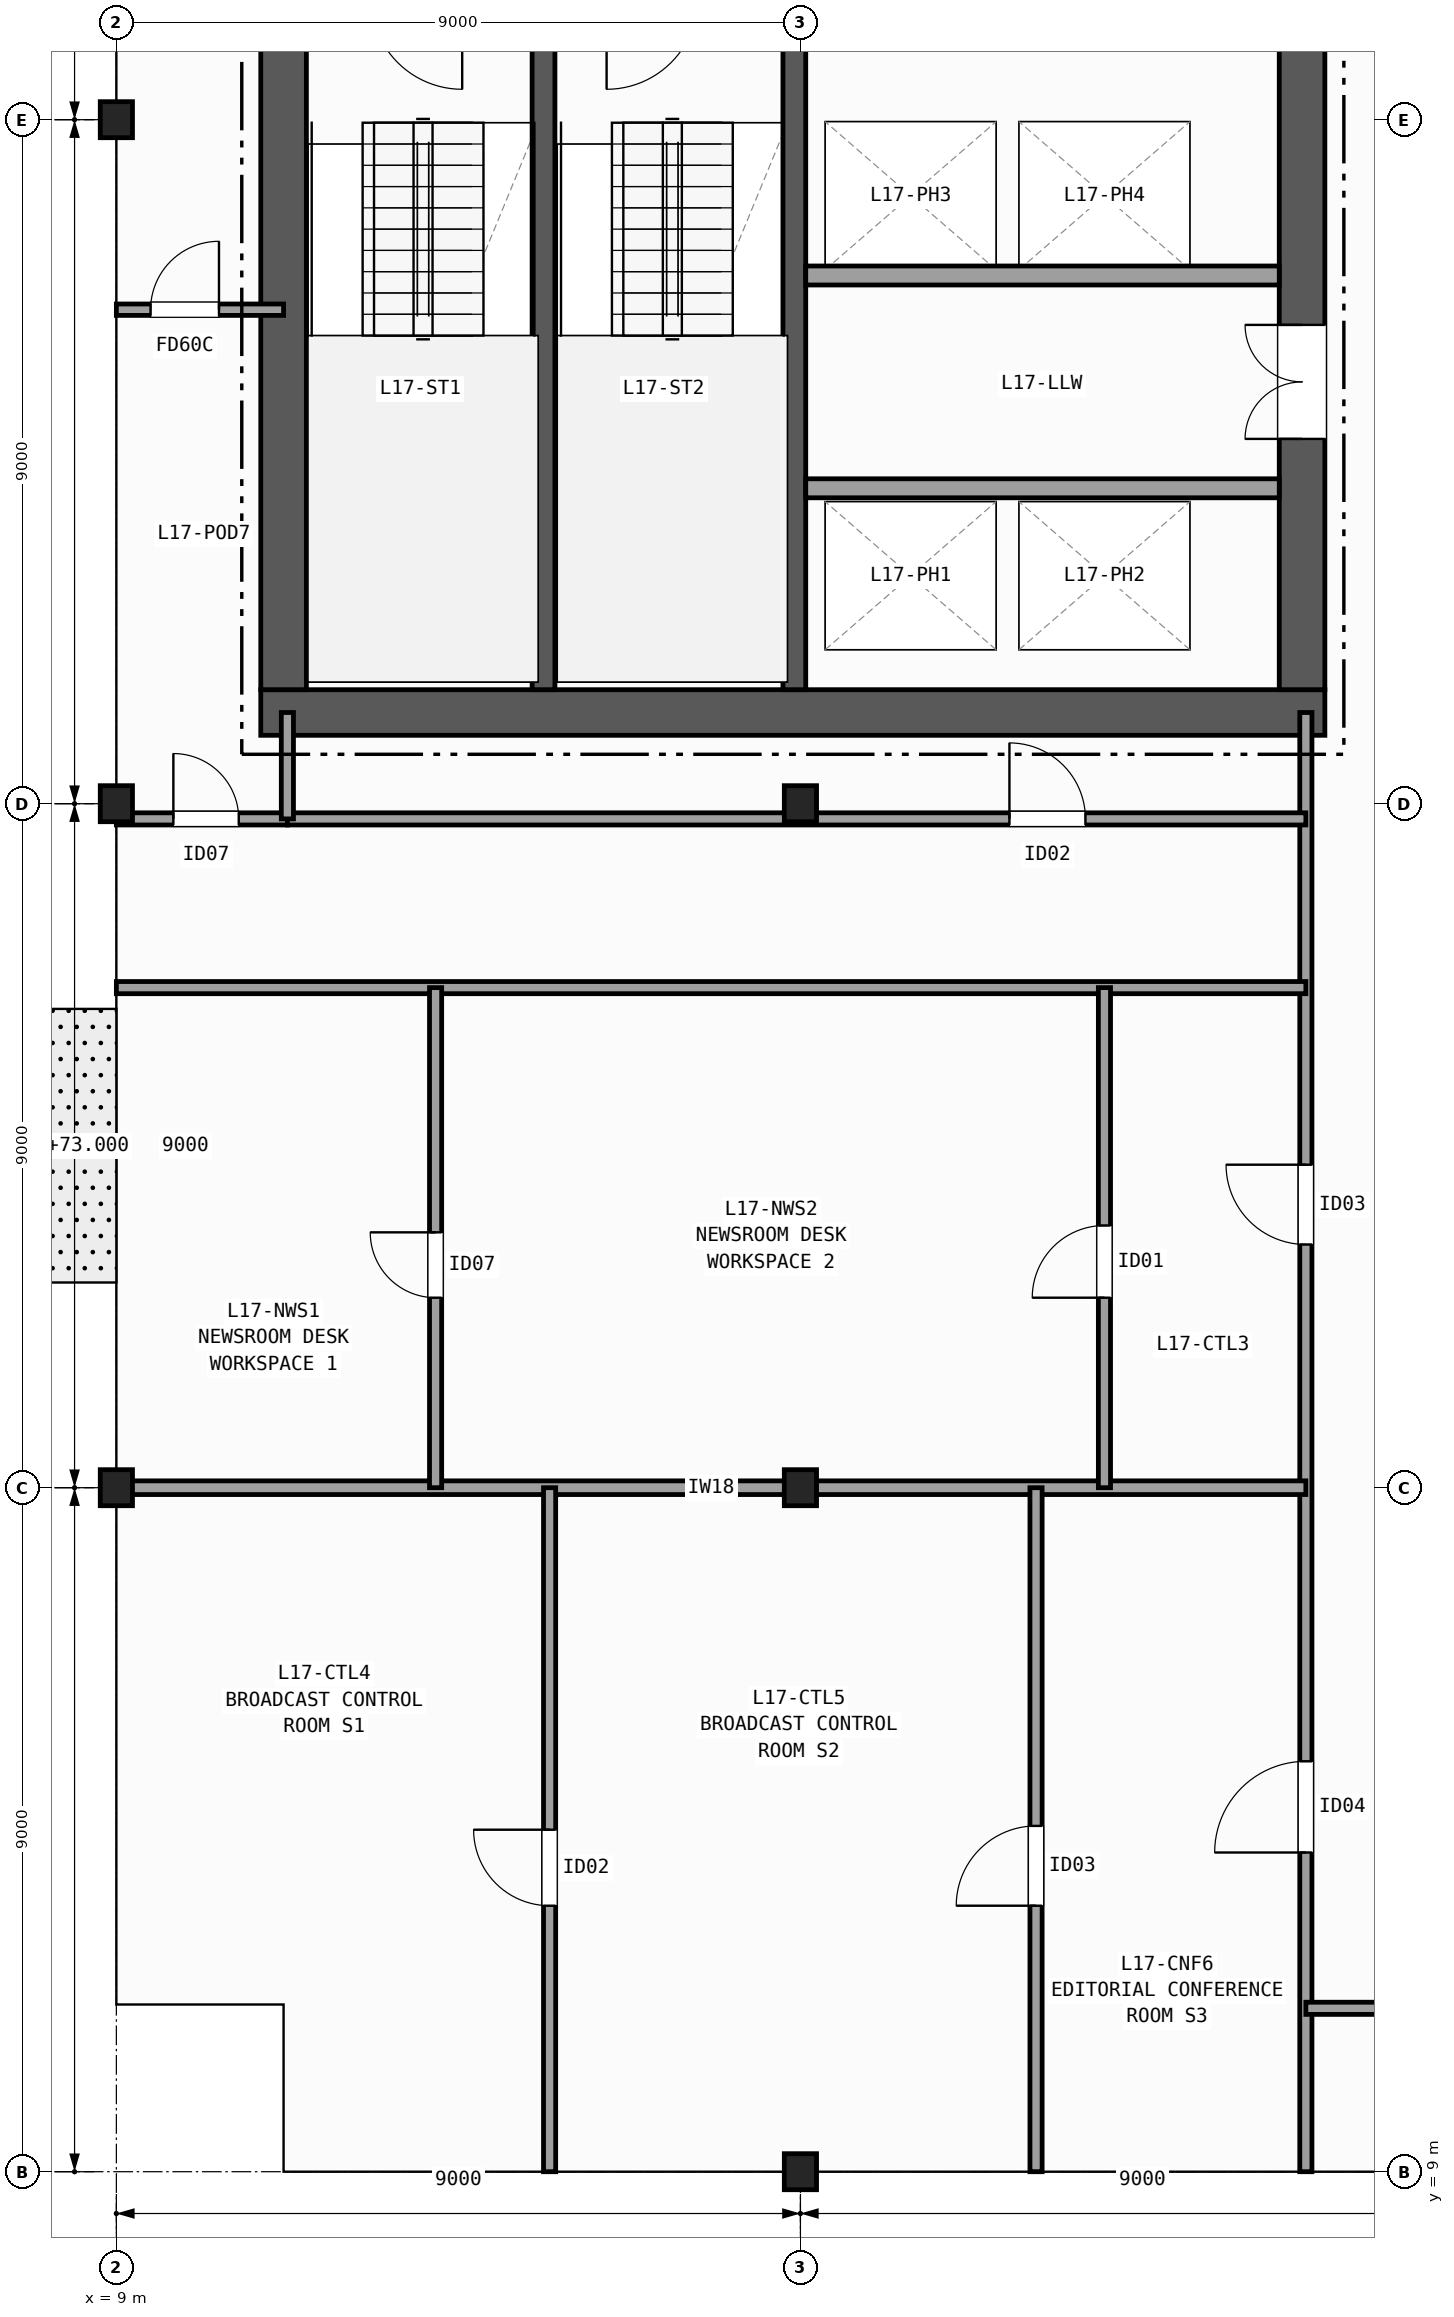
"""IFC4 building model, lengths in metres.
Left out: names, types, materials, properties, quantities, classifications, styles, units other than length and angle.
Written with IfcOpenShell. Run it as: python <this file> out.ifc"""

import sys

from ifc_helpers import new_model, si_unit, direction, frame, frame_2d, origin, origin_2d, place, context, subcontext, project, spatial, rectangle, i_section, extrude, element, fill, save


model = new_model("IFC4")
c1 = context("Model", 3, precision=1e-05, world=origin(), true_north=direction((0.0, 1.0)))
c2 = subcontext(c1, "Body", "Model", "MODEL_VIEW")
j1 = project(units=[si_unit("LENGTHUNIT", "METRE"), si_unit("PLANEANGLEUNIT", "RADIAN")], contexts=[c1])
p1 = place(None, origin())
s1 = spatial("IfcSite", under=j1, at=p1, CompositionType="ELEMENT")
p2 = place(p1, origin())
s2 = spatial("IfcBuilding", under=s1, at=p2, CompositionType="ELEMENT")
p3 = place(p2, frame((0.0, 0.0, 73.0)))
s3 = spatial("IfcBuildingStorey", under=s2, at=p3, CompositionType="ELEMENT", Elevation=73.0)
for number, where, z_axis, x_axis in (
    (1, (9.0, 18.0, 0.0), (0.0, 0.0, 1.0), (1.0, 0.0, 0.0)),
    (2, (9.0, 27.0, 0.0), (0.0, 0.0, 1.0), (1.0, 0.0, 0.0)),
    (3, (9.0, 36.0, 0.0), (0.0, 0.0, 1.0), (1.0, 0.0, 0.0)),
    (4, (18.0, 9.0, 0.0), (0.0, 0.0, 1.0), (1.0, 0.0, 0.0)),
    (5, (18.0, 18.0, 0.0), (0.0, 0.0, 1.0), (1.0, 0.0, 0.0)),
    (6, (18.0, 27.0, 0.0), (0.0, 0.0, 1.0), (1.0, 0.0, 0.0)),
):
    element("IfcColumn", number, at=place(p3, frame(where, z_axis=z_axis, x_axis=x_axis)), inside=s3, PredefinedType="COLUMN", context=c2, shape_type="SweptSolid", body=[
        extrude(i_section(OverallWidth=0.424, OverallDepth=0.474, WebThickness=0.048, FlangeThickness=0.077, FilletRadius=0.015, at=origin_2d()), origin(), (0.0, 0.0, 1.0), 3.7),
    ])
p4 = place(p3, frame((10.9, 28.2, 0.0), z_axis=(0.0, 0.0, 1.0), x_axis=(1.0, 0.0, 0.0)))
e7 = element("IfcWall", 7, at=p4, inside=s3, PredefinedType="SHEAR", context=c2, shape_type="SweptSolid", body=[
    extrude(rectangle(XDim=14.0, YDim=0.6, at=frame_2d((7.0, 0.0))), origin(), (0.0, 0.0, 1.0), 3.42),
])
p5 = place(p3, frame((11.2, 42.1, 0.0), z_axis=(0.0, 0.0, 1.0), x_axis=(0.0, -1.0, 0.0)))
e8 = element("IfcWall", 8, at=p5, inside=s3, PredefinedType="SHEAR", context=c2, shape_type="SweptSolid", body=[
    extrude(rectangle(XDim=13.6, YDim=0.6, at=frame_2d((6.8, 0.0))), origin(), (0.0, 0.0, 1.0), 3.42),
])
p6 = place(p3, frame((24.6, 28.5, 0.0), z_axis=(0.0, 0.0, 1.0), x_axis=(0.0, 1.0, 0.0)))
e9 = element("IfcWall", 9, at=p6, inside=s3, PredefinedType="SHEAR", context=c2, shape_type="SweptSolid", body=[
    extrude(rectangle(XDim=13.6, YDim=0.6, at=frame_2d((6.8, 0.0))), origin(), (0.0, 0.0, 1.0), 3.42),
])
p7 = place(p6, frame((3.3, 0.0, 0.0)))
e10 = element("IfcOpeningElement", 10, at=p7, cuts=e9, PredefinedType="OPENING", context=c2, shape_type="SweptSolid", body=[
    extrude(rectangle(XDim=1.5, YDim=2.2, at=frame_2d((0.75, 1.1))), frame((0.0, 0.31, 0.0), z_axis=(0.0, -1.0, 0.0), x_axis=(1.0, 0.0, 0.0)), (0.0, 0.0, 1.0), 0.62),
])
p8 = place(p6, frame((9.9, 0.0, 0.0)))
e11 = element("IfcOpeningElement", 11, at=p8, cuts=e9, PredefinedType="OPENING", context=c2, shape_type="SweptSolid", body=[
    extrude(rectangle(XDim=0.9, YDim=2.1, at=frame_2d((0.45, 1.05))), frame((0.0, 0.31, 0.0), z_axis=(0.0, -1.0, 0.0), x_axis=(1.0, 0.0, 0.0)), (0.0, 0.0, 1.0), 0.62),
])
p9 = place(p3, frame((14.62, 28.5, 0.0), z_axis=(0.0, 0.0, 1.0), x_axis=(0.0, 1.0, 0.0)))
e12 = element("IfcWall", 12, at=p9, inside=s3, PredefinedType="SHEAR", context=c2, shape_type="SweptSolid", body=[
    extrude(rectangle(XDim=8.95, YDim=0.3, at=frame_2d((4.475, 0.0))), origin(), (0.0, 0.0, 1.0), 3.42),
])
p10 = place(p3, frame((17.92, 42.1, 0.0), z_axis=(0.0, 0.0, 1.0), x_axis=(0.0, -1.0, 0.0)))
e13 = element("IfcWall", 13, at=p10, inside=s3, PredefinedType="SHEAR", context=c2, shape_type="SweptSolid", body=[
    extrude(rectangle(XDim=13.6, YDim=0.3, at=frame_2d((6.8, 0.0))), origin(), (0.0, 0.0, 1.0), 3.42),
])
p11 = place(p10, frame((1.925, 0.0, 0.0)))
e14 = element("IfcOpeningElement", 14, at=p11, cuts=e13, PredefinedType="OPENING", context=c2, shape_type="SweptSolid", body=[
    extrude(rectangle(XDim=1.15, YDim=2.15, at=frame_2d((0.575, 1.075))), frame((0.0, 0.16, 0.0), z_axis=(0.0, -1.0, 0.0), x_axis=(1.0, 0.0, 0.0)), (0.0, 0.0, 1.0), 0.32),
])
for number, where, z_axis, x_axis in (
    (15, (18.07, 31.15, 0.0), (0.0, 0.0, 1.0), (1.0, 0.0, 0.0)),
    (16, (24.3, 33.95, 0.0), (0.0, 0.0, 1.0), (-1.0, 0.0, 0.0)),
):
    element("IfcWall", number, at=place(p3, frame(where, z_axis=z_axis, x_axis=x_axis)), inside=s3, PredefinedType="PARTITIONING", context=c2, shape_type="SweptSolid", body=[
        extrude(rectangle(XDim=6.23, YDim=0.25, at=frame_2d((3.115, 0.0))), origin(), (0.0, 0.0, 1.0), 3.42),
    ])
p12 = place(p3, frame((9.0, 26.8, 0.0), z_axis=(0.0, 0.0, 1.0), x_axis=(1.0, 0.0, 0.0)))
e17 = element("IfcWall", 17, at=p12, inside=s3, PredefinedType="PARTITIONING", context=c2, shape_type="SweptSolid", body=[
    extrude(rectangle(XDim=2.25, YDim=0.16, at=frame_2d((1.125, 0.0))), origin(), (0.0, 0.0, 1.0), 2.627),
])
p13 = place(p12, frame((0.75, 0.0, 0.0)))
e18 = element("IfcOpeningElement", 18, at=p13, cuts=e17, PredefinedType="OPENING", context=c2, shape_type="SweptSolid", body=[
    extrude(rectangle(XDim=0.86, YDim=2.05, at=frame_2d((0.43, 1.025))), frame((0.0, 0.09, 0.0), z_axis=(0.0, -1.0, 0.0), x_axis=(1.0, 0.0, 0.0)), (0.0, 0.0, 1.0), 0.18),
])
p14 = place(p3, frame((9.0, 33.5, 0.0), z_axis=(0.0, 0.0, 1.0), x_axis=(1.0, 0.0, 0.0)))
e19 = element("IfcWall", 19, at=p14, inside=s3, PredefinedType="PARTITIONING", context=c2, shape_type="SweptSolid", body=[
    extrude(rectangle(XDim=2.2, YDim=0.15, at=frame_2d((1.1, 0.0))), origin(), (0.0, 0.0, 1.0), 2.627),
])
p15 = place(p14, frame((0.45, 0.0, 0.0)))
e20 = element("IfcOpeningElement", 20, at=p15, cuts=e19, PredefinedType="OPENING", context=c2, shape_type="SweptSolid", body=[
    extrude(rectangle(XDim=0.9, YDim=2.1, at=frame_2d((0.45, 1.05))), frame((0.0, 0.085, 0.0), z_axis=(0.0, -1.0, 0.0), x_axis=(1.0, 0.0, 0.0)), (0.0, 0.0, 1.0), 0.17),
])
p16 = place(p3, frame((24.65, 9.0, 0.0), z_axis=(0.0, 0.0, 1.0), x_axis=(0.0, 1.0, 0.0)))
e21 = element("IfcWall", 21, at=p16, inside=s3, PredefinedType="PARTITIONING", context=c2, shape_type="SweptSolid", body=[
    extrude(rectangle(XDim=19.2, YDim=0.16, at=frame_2d((9.6, 0.0))), origin(), (0.0, 0.0, 1.0), 2.627),
])
p17 = place(p16, frame((12.2, 0.0, 0.0)))
e22 = element("IfcOpeningElement", 22, at=p17, cuts=e21, PredefinedType="OPENING", context=c2, shape_type="SweptSolid", body=[
    extrude(rectangle(XDim=1.05, YDim=2.15, at=frame_2d((0.525, 1.075))), frame((0.0, 0.09, 0.0), z_axis=(0.0, -1.0, 0.0), x_axis=(1.0, 0.0, 0.0)), (0.0, 0.0, 1.0), 0.18),
])
p18 = place(p16, frame((4.2, 0.0, 0.0)))
e23 = element("IfcOpeningElement", 23, at=p18, cuts=e21, PredefinedType="OPENING", context=c2, shape_type="SweptSolid", body=[
    extrude(rectangle(XDim=1.2, YDim=2.15, at=frame_2d((0.6, 1.075))), frame((0.0, 0.09, 0.0), z_axis=(0.0, -1.0, 0.0), x_axis=(1.0, 0.0, 0.0)), (0.0, 0.0, 1.0), 0.18),
])
p19 = place(p3, frame((9.0, 24.58, 0.0), z_axis=(0.0, 0.0, 1.0), x_axis=(1.0, 0.0, 0.0)))
e24 = element("IfcWall", 24, at=p19, inside=s3, PredefinedType="PARTITIONING", context=c2, shape_type="SweptSolid", body=[
    extrude(rectangle(XDim=15.65, YDim=0.16, at=frame_2d((7.825, 0.0))), origin(), (0.0, 0.0, 1.0), 2.627),
])
p20 = place(p3, frame((11.25, 26.8, 0.0), z_axis=(0.0, 0.0, 1.0), x_axis=(1.0, 0.0, 0.0)))
e25 = element("IfcWall", 25, at=p20, inside=s3, PredefinedType="PARTITIONING", context=c2, shape_type="SweptSolid", body=[
    extrude(rectangle(XDim=13.4, YDim=0.16, at=frame_2d((6.7, 0.0))), origin(), (0.0, 0.0, 1.0), 2.789),
])
p21 = place(p20, frame((9.5, 0.0, 0.0)))
e26 = element("IfcOpeningElement", 26, at=p21, cuts=e25, PredefinedType="OPENING", context=c2, shape_type="SweptSolid", body=[
    extrude(rectangle(XDim=1.0, YDim=2.1, at=frame_2d((0.5, 1.05))), frame((0.0, 0.09, 0.0), z_axis=(0.0, -1.0, 0.0), x_axis=(1.0, 0.0, 0.0)), (0.0, 0.0, 1.0), 0.18),
])
p22 = place(p3, frame((11.25, 26.8, 0.0), z_axis=(0.0, 0.0, 1.0), x_axis=(0.0, 1.0, 0.0)))
e27 = element("IfcWall", 27, at=p22, inside=s3, PredefinedType="PARTITIONING", context=c2, shape_type="SweptSolid", body=[
    extrude(rectangle(XDim=1.4, YDim=0.16, at=frame_2d((0.7, 0.0))), origin(), (0.0, 0.0, 1.0), 2.789),
])
p23 = place(p3, frame((9.0, 18.0, 0.0), z_axis=(0.0, 0.0, 1.0), x_axis=(1.0, 0.0, 0.0)))
e28 = element("IfcWall", 28, at=p23, inside=s3, PredefinedType="PARTITIONING", context=c2, shape_type="SweptSolid", body=[
    extrude(rectangle(XDim=15.65, YDim=0.18, at=frame_2d((7.825, 0.0))), origin(), (0.0, 0.0, 1.0), 2.627),
])
p24 = place(p3, frame((13.2, 18.0, 0.0), z_axis=(0.0, 0.0, 1.0), x_axis=(0.0, 1.0, 0.0)))
e29 = element("IfcWall", 29, at=p24, inside=s3, PredefinedType="PARTITIONING", context=c2, shape_type="SweptSolid", body=[
    extrude(rectangle(XDim=6.58, YDim=0.16, at=frame_2d((3.29, 0.0))), origin(), (0.0, 0.0, 1.0), 2.789),
])
p25 = place(p24, frame((2.5, 0.0, 0.0)))
e30 = element("IfcOpeningElement", 30, at=p25, cuts=e29, PredefinedType="OPENING", context=c2, shape_type="SweptSolid", body=[
    extrude(rectangle(XDim=0.86, YDim=2.05, at=frame_2d((0.43, 1.025))), frame((0.0, 0.09, 0.0), z_axis=(0.0, -1.0, 0.0), x_axis=(1.0, 0.0, 0.0)), (0.0, 0.0, 1.0), 0.18),
])
p26 = place(p3, frame((22.0, 18.0, 0.0), z_axis=(0.0, 0.0, 1.0), x_axis=(0.0, 1.0, 0.0)))
e31 = element("IfcWall", 31, at=p26, inside=s3, PredefinedType="PARTITIONING", context=c2, shape_type="SweptSolid", body=[
    extrude(rectangle(XDim=6.58, YDim=0.16, at=frame_2d((3.29, 0.0))), origin(), (0.0, 0.0, 1.0), 2.789),
])
p27 = place(p26, frame((2.5, 0.0, 0.0)))
e32 = element("IfcOpeningElement", 32, at=p27, cuts=e31, PredefinedType="OPENING", context=c2, shape_type="SweptSolid", body=[
    extrude(rectangle(XDim=0.95, YDim=2.1, at=frame_2d((0.475, 1.05))), frame((0.0, 0.09, 0.0), z_axis=(0.0, -1.0, 0.0), x_axis=(1.0, 0.0, 0.0)), (0.0, 0.0, 1.0), 0.18),
])
p28 = place(p3, frame((14.7, 9.0, 0.0), z_axis=(0.0, 0.0, 1.0), x_axis=(0.0, 1.0, 0.0)))
e33 = element("IfcWall", 33, at=p28, inside=s3, PredefinedType="PARTITIONING", context=c2, shape_type="SweptSolid", body=[
    extrude(rectangle(XDim=9.0, YDim=0.16, at=frame_2d((4.5, 0.0))), origin(), (0.0, 0.0, 1.0), 2.789),
])
p29 = place(p28, frame((3.5, 0.0, 0.0)))
e34 = element("IfcOpeningElement", 34, at=p29, cuts=e33, PredefinedType="OPENING", context=c2, shape_type="SweptSolid", body=[
    extrude(rectangle(XDim=1.0, YDim=2.1, at=frame_2d((0.5, 1.05))), frame((0.0, 0.09, 0.0), z_axis=(0.0, -1.0, 0.0), x_axis=(1.0, 0.0, 0.0)), (0.0, 0.0, 1.0), 0.18),
])
p30 = place(p3, frame((21.1, 9.0, 0.0), z_axis=(0.0, 0.0, 1.0), x_axis=(0.0, 1.0, 0.0)))
e35 = element("IfcWall", 35, at=p30, inside=s3, PredefinedType="PARTITIONING", context=c2, shape_type="SweptSolid", body=[
    extrude(rectangle(XDim=9.0, YDim=0.16, at=frame_2d((4.5, 0.0))), origin(), (0.0, 0.0, 1.0), 2.627),
])
p31 = place(p30, frame((3.5, 0.0, 0.0)))
e36 = element("IfcOpeningElement", 36, at=p31, cuts=e35, PredefinedType="OPENING", context=c2, shape_type="SweptSolid", body=[
    extrude(rectangle(XDim=1.05, YDim=2.15, at=frame_2d((0.525, 1.075))), frame((0.0, 0.09, 0.0), z_axis=(0.0, -1.0, 0.0), x_axis=(1.0, 0.0, 0.0)), (0.0, 0.0, 1.0), 0.18),
])
p32 = place(p3, frame((24.65, 11.15, 0.0), z_axis=(0.0, 0.0, 1.0), x_axis=(1.0, 0.0, 0.0)))
e37 = element("IfcWall", 37, at=p32, inside=s3, PredefinedType="PARTITIONING", context=c2, shape_type="SweptSolid", body=[
    extrude(rectangle(XDim=4.75, YDim=0.16, at=frame_2d((2.375, 0.0))), origin(), (0.0, 0.0, 1.0), 2.792),
])
p33 = place(p32, frame((1.2, 0.0, 0.0)))
e38 = element("IfcOpeningElement", 38, at=p33, cuts=e37, PredefinedType="OPENING", context=c2, shape_type="SweptSolid", body=[
    extrude(rectangle(XDim=1.0, YDim=2.1, at=frame_2d((0.5, 1.05))), frame((0.0, 0.09, 0.0), z_axis=(0.0, -1.0, 0.0), x_axis=(1.0, 0.0, 0.0)), (0.0, 0.0, 1.0), 0.18),
])
p34 = place(p7, origin())
e39 = element("IfcDoor", 39, at=p34, inside=s3, OperationType="DOUBLE_DOOR_SINGLE_SWING", PredefinedType="DOOR", context=c2, shape_type="SweptSolid", body=[
    extrude(rectangle(XDim=1.5, YDim=2.2, at=frame_2d((0.75, 1.1))), frame((0.0, 0.025, 0.0), z_axis=(0.0, -1.0, 0.0), x_axis=(1.0, 0.0, 0.0)), (0.0, 0.0, 1.0), 0.05),
])
fill(e10, e39)
p35 = place(p13, origin())
e40 = element("IfcDoor", 40, at=p35, inside=s3, OperationType="SINGLE_SWING_LEFT", PredefinedType="DOOR", context=c2, shape_type="SweptSolid", body=[
    extrude(rectangle(XDim=0.86, YDim=2.05, at=frame_2d((0.43, 1.025))), frame((0.0, 0.025, 0.0), z_axis=(0.0, -1.0, 0.0), x_axis=(1.0, 0.0, 0.0)), (0.0, 0.0, 1.0), 0.05),
])
fill(e18, e40)
p36 = place(p15, origin())
e41 = element("IfcDoor", 41, at=p36, inside=s3, OperationType="SINGLE_SWING_RIGHT", PredefinedType="DOOR", context=c2, shape_type="SweptSolid", body=[
    extrude(rectangle(XDim=0.9, YDim=2.1, at=frame_2d((0.45, 1.05))), frame((0.0, 0.025, 0.0), z_axis=(0.0, -1.0, 0.0), x_axis=(1.0, 0.0, 0.0)), (0.0, 0.0, 1.0), 0.05),
])
fill(e20, e41)
p37 = place(p21, origin())
e42 = element("IfcDoor", 42, at=p37, inside=s3, OperationType="SINGLE_SWING_LEFT", PredefinedType="DOOR", context=c2, shape_type="SweptSolid", body=[
    extrude(rectangle(XDim=1.0, YDim=2.1, at=frame_2d((0.5, 1.05))), frame((0.0, 0.025, 0.0), z_axis=(0.0, -1.0, 0.0), x_axis=(1.0, 0.0, 0.0)), (0.0, 0.0, 1.0), 0.05),
])
fill(e26, e42)
p38 = place(p17, origin())
e43 = element("IfcDoor", 43, at=p38, inside=s3, OperationType="SINGLE_SWING_RIGHT", PredefinedType="DOOR", context=c2, shape_type="SweptSolid", body=[
    extrude(rectangle(XDim=1.05, YDim=2.15, at=frame_2d((0.525, 1.075))), frame((0.0, 0.025, 0.0), z_axis=(0.0, -1.0, 0.0), x_axis=(1.0, 0.0, 0.0)), (0.0, 0.0, 1.0), 0.05),
])
fill(e22, e43)
p39 = place(p18, origin())
e44 = element("IfcDoor", 44, at=p39, inside=s3, OperationType="SINGLE_SWING_LEFT", PredefinedType="DOOR", context=c2, shape_type="SweptSolid", body=[
    extrude(rectangle(XDim=1.2, YDim=2.15, at=frame_2d((0.6, 1.075))), frame((0.0, 0.025, 0.0), z_axis=(0.0, -1.0, 0.0), x_axis=(1.0, 0.0, 0.0)), (0.0, 0.0, 1.0), 0.05),
])
fill(e23, e44)
p40 = place(p25, origin())
e45 = element("IfcDoor", 45, at=p40, inside=s3, OperationType="SINGLE_SWING_RIGHT", PredefinedType="DOOR", context=c2, shape_type="SweptSolid", body=[
    extrude(rectangle(XDim=0.86, YDim=2.05, at=frame_2d((0.43, 1.025))), frame((0.0, 0.025, 0.0), z_axis=(0.0, -1.0, 0.0), x_axis=(1.0, 0.0, 0.0)), (0.0, 0.0, 1.0), 0.05),
])
fill(e30, e45)
p41 = place(p27, origin())
e46 = element("IfcDoor", 46, at=p41, inside=s3, OperationType="SINGLE_SWING_LEFT", PredefinedType="DOOR", context=c2, shape_type="SweptSolid", body=[
    extrude(rectangle(XDim=0.95, YDim=2.1, at=frame_2d((0.475, 1.05))), frame((0.0, 0.025, 0.0), z_axis=(0.0, -1.0, 0.0), x_axis=(1.0, 0.0, 0.0)), (0.0, 0.0, 1.0), 0.05),
])
fill(e32, e46)
p42 = place(p29, origin())
e47 = element("IfcDoor", 47, at=p42, inside=s3, OperationType="SINGLE_SWING_RIGHT", PredefinedType="DOOR", context=c2, shape_type="SweptSolid", body=[
    extrude(rectangle(XDim=1.0, YDim=2.1, at=frame_2d((0.5, 1.05))), frame((0.0, 0.025, 0.0), z_axis=(0.0, -1.0, 0.0), x_axis=(1.0, 0.0, 0.0)), (0.0, 0.0, 1.0), 0.05),
])
fill(e34, e47)
p43 = place(p31, origin())
e48 = element("IfcDoor", 48, at=p43, inside=s3, OperationType="SINGLE_SWING_LEFT", PredefinedType="DOOR", context=c2, shape_type="SweptSolid", body=[
    extrude(rectangle(XDim=1.05, YDim=2.15, at=frame_2d((0.525, 1.075))), frame((0.0, 0.025, 0.0), z_axis=(0.0, -1.0, 0.0), x_axis=(1.0, 0.0, 0.0)), (0.0, 0.0, 1.0), 0.05),
])
fill(e36, e48)
save(model, sys.argv[1])
